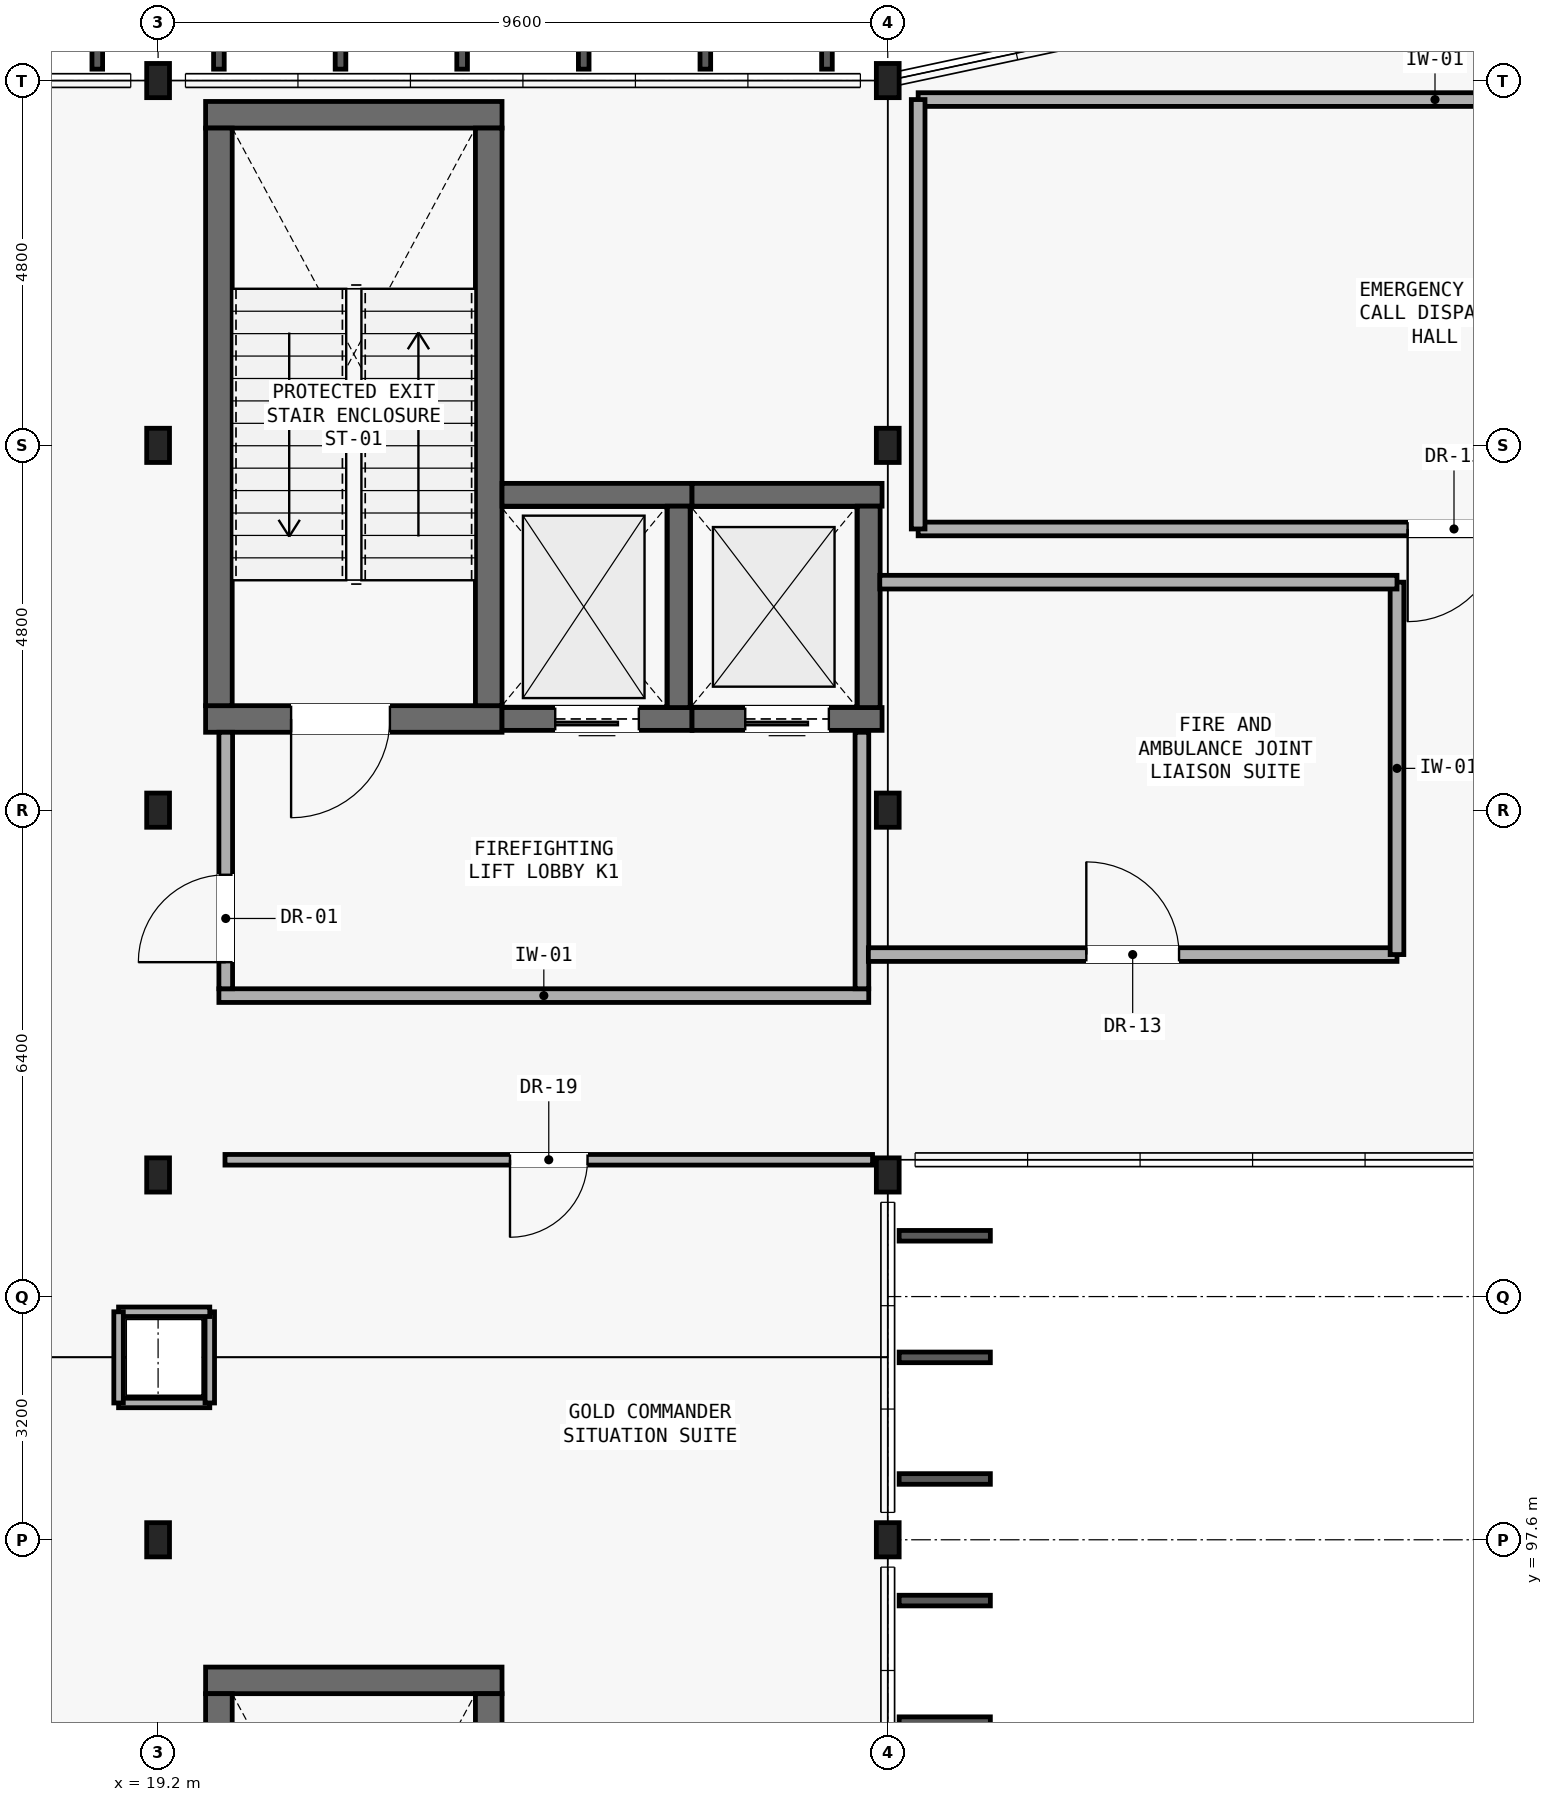
"""IFC4 building model, lengths in metres.
Left out: names, types, materials, properties, quantities, classifications, styles, units other than length and angle.
Written with IfcOpenShell. Run it as: python <this file> out.ifc"""

import sys

from ifc_helpers import new_model, si_unit, direction, frame, frame_2d, origin, origin_2d, place, context, subcontext, project, spatial, rectangle, i_section, extrude, element, fill, save


model = new_model("IFC4")
c1 = context("Model", 3, precision=1e-05, world=origin(), true_north=direction((0.0, 1.0)))
c2 = subcontext(c1, "Body", "Model", "MODEL_VIEW")
j1 = project(units=[si_unit("LENGTHUNIT", "METRE"), si_unit("PLANEANGLEUNIT", "RADIAN")], contexts=[c1])
p1 = place(None, origin())
s1 = spatial("IfcSite", under=j1, at=p1, CompositionType="ELEMENT")
p2 = place(p1, origin())
s2 = spatial("IfcBuilding", under=s1, at=p2, CompositionType="ELEMENT")
p3 = place(p2, frame((0.0, 0.0, 26.25)))
s3 = spatial("IfcBuildingStorey", under=s2, at=p3, CompositionType="ELEMENT", Elevation=26.25)
for number, where, z_axis, x_axis in (
    (1, (28.8, 97.6, 0.0), (0.0, 0.0, 1.0), (1.0, 0.0, 0.0)),
    (2, (28.8, 102.4, 0.0), (0.0, 0.0, 1.0), (1.0, 0.0, 0.0)),
    (3, (28.8, 107.2, 0.0), (0.0, 0.0, 1.0), (1.0, 0.0, 0.0)),
    (4, (28.8, 112.0, 0.0), (0.0, 0.0, 1.0), (1.0, 0.0, 0.0)),
    (5, (28.8, 116.8, 0.0), (0.0, 0.0, 1.0), (1.0, 0.0, 0.0)),
    (6, (19.2, 116.8, 0.0), (0.0, 0.0, 1.0), (1.0, 0.0, 0.0)),
    (7, (19.2, 97.6, 0.0), (0.0, 0.0, 1.0), (1.0, 0.0, 0.0)),
    (8, (19.2, 102.4, 0.0), (0.0, 0.0, 1.0), (1.0, 0.0, 0.0)),
    (9, (19.2, 107.2, 0.0), (0.0, 0.0, 1.0), (1.0, 0.0, 0.0)),
    (10, (19.2, 112.0, 0.0), (0.0, 0.0, 1.0), (1.0, 0.0, 0.0)),
):
    element("IfcColumn", number, at=place(p3, frame(where, z_axis=z_axis, x_axis=x_axis)), inside=s3, PredefinedType="COLUMN", context=c2, shape_type="SweptSolid", body=[
        extrude(i_section(OverallWidth=0.3, OverallDepth=0.45, WebThickness=0.014, FlangeThickness=0.026, FilletRadius=0.027, at=origin_2d()), origin(), (0.0, 0.0, 1.0), 4.9),
    ])
p4 = place(p3, frame((19.825, 108.4, 0.0), z_axis=(0.0, 0.0, 1.0), x_axis=(1.0, 0.0, 0.0)))
e11 = element("IfcWall", 11, at=p4, inside=s3, PredefinedType="SHEAR", context=c2, shape_type="SweptSolid", body=[
    extrude(rectangle(XDim=3.9, YDim=0.35, at=frame_2d((1.95, 0.0))), origin(), (0.0, 0.0, 1.0), 4.71),
])
p5 = place(p4, frame((1.125, 0.0, 0.0)))
e12 = element("IfcOpeningElement", 12, at=p5, cuts=e11, PredefinedType="OPENING", context=c2, shape_type="SweptSolid", body=[
    extrude(rectangle(XDim=1.3, YDim=2.15, at=frame_2d((0.65, 1.075))), frame((0.0, 0.185, 0.0), z_axis=(0.0, -1.0, 0.0), x_axis=(1.0, 0.0, 0.0)), (0.0, 0.0, 1.0), 0.37),
])
p6 = place(p3, frame((19.825, 116.35, 0.0), z_axis=(0.0, 0.0, 1.0), x_axis=(1.0, 0.0, 0.0)))
e13 = element("IfcWall", 13, at=p6, inside=s3, PredefinedType="SHEAR", context=c2, shape_type="SweptSolid", body=[
    extrude(rectangle(XDim=3.9, YDim=0.35, at=frame_2d((1.95, 0.0))), origin(), (0.0, 0.0, 1.0), 4.71),
])
for number, where, z_axis, x_axis in (
    (14, (20.0, 108.575, 0.0), (0.0, 0.0, 1.0), (0.0, 1.0, 0.0)),
    (15, (23.55, 108.575, 0.0), (0.0, 0.0, 1.0), (0.0, 1.0, 0.0)),
):
    element("IfcWall", number, at=place(p3, frame(where, z_axis=z_axis, x_axis=x_axis)), inside=s3, PredefinedType="SHEAR", context=c2, shape_type="SweptSolid", body=[
        extrude(rectangle(XDim=7.6, YDim=0.35, at=frame_2d((3.8, 0.0))), origin(), (0.0, 0.0, 1.0), 4.71),
    ])
p7 = place(p3, frame((23.725, 108.4, 0.0), z_axis=(0.0, 0.0, 1.0), x_axis=(1.0, 0.0, 0.0)))
e16 = element("IfcWall", 16, at=p7, inside=s3, PredefinedType="SHEAR", context=c2, shape_type="SweptSolid", body=[
    extrude(rectangle(XDim=2.5, YDim=0.3, at=frame_2d((1.25, 0.0))), origin(), (0.0, 0.0, 1.0), 4.71),
])
p8 = place(p7, frame((0.7, 0.0, 0.0)))
e17 = element("IfcOpeningElement", 17, at=p8, cuts=e16, PredefinedType="OPENING", context=c2, shape_type="SweptSolid", body=[
    extrude(rectangle(XDim=1.1, YDim=2.1, at=frame_2d((0.55, 1.05))), frame((0.0, 0.16, 0.0), z_axis=(0.0, -1.0, 0.0), x_axis=(1.0, 0.0, 0.0)), (0.0, 0.0, 1.0), 0.32),
])
p9 = place(p3, frame((23.725, 111.35, 0.0), z_axis=(0.0, 0.0, 1.0), x_axis=(1.0, 0.0, 0.0)))
e18 = element("IfcWall", 18, at=p9, inside=s3, PredefinedType="SHEAR", context=c2, shape_type="SweptSolid", body=[
    extrude(rectangle(XDim=2.5, YDim=0.3, at=frame_2d((1.25, 0.0))), origin(), (0.0, 0.0, 1.0), 4.71),
])
p10 = place(p3, frame((26.05, 108.55, 0.0), z_axis=(0.0, 0.0, 1.0), x_axis=(0.0, 1.0, 0.0)))
e19 = element("IfcWall", 19, at=p10, inside=s3, PredefinedType="SHEAR", context=c2, shape_type="SweptSolid", body=[
    extrude(rectangle(XDim=2.65, YDim=0.3, at=frame_2d((1.325, 0.0))), origin(), (0.0, 0.0, 1.0), 4.71),
])
p11 = place(p3, frame((26.225, 108.4, 0.0), z_axis=(0.0, 0.0, 1.0), x_axis=(1.0, 0.0, 0.0)))
e20 = element("IfcWall", 20, at=p11, inside=s3, PredefinedType="SHEAR", context=c2, shape_type="SweptSolid", body=[
    extrude(rectangle(XDim=2.5, YDim=0.3, at=frame_2d((1.25, 0.0))), origin(), (0.0, 0.0, 1.0), 4.71),
])
p12 = place(p11, frame((0.7, 0.0, 0.0)))
e21 = element("IfcOpeningElement", 21, at=p12, cuts=e20, PredefinedType="OPENING", context=c2, shape_type="SweptSolid", body=[
    extrude(rectangle(XDim=1.1, YDim=2.1, at=frame_2d((0.55, 1.05))), frame((0.0, 0.16, 0.0), z_axis=(0.0, -1.0, 0.0), x_axis=(1.0, 0.0, 0.0)), (0.0, 0.0, 1.0), 0.32),
])
p13 = place(p3, frame((26.225, 111.35, 0.0), z_axis=(0.0, 0.0, 1.0), x_axis=(1.0, 0.0, 0.0)))
e22 = element("IfcWall", 22, at=p13, inside=s3, PredefinedType="SHEAR", context=c2, shape_type="SweptSolid", body=[
    extrude(rectangle(XDim=2.5, YDim=0.3, at=frame_2d((1.25, 0.0))), origin(), (0.0, 0.0, 1.0), 4.71),
])
p14 = place(p3, frame((28.55, 108.55, 0.0), z_axis=(0.0, 0.0, 1.0), x_axis=(0.0, 1.0, 0.0)))
e23 = element("IfcWall", 23, at=p14, inside=s3, PredefinedType="SHEAR", context=c2, shape_type="SweptSolid", body=[
    extrude(rectangle(XDim=2.65, YDim=0.3, at=frame_2d((1.325, 0.0))), origin(), (0.0, 0.0, 1.0), 4.71),
])
p15 = place(p3, frame((20.0, 104.76, 0.0), z_axis=(0.0, 0.0, 1.0), x_axis=(1.0, 0.0, 0.0)))
e24 = element("IfcWall", 24, at=p15, inside=s3, PredefinedType="PARTITIONING", context=c2, shape_type="SweptSolid", body=[
    extrude(rectangle(XDim=8.55, YDim=0.18, at=frame_2d((4.275, 0.0))), origin(), (0.0, 0.0, 1.0), 4.19),
])
p16 = place(p3, frame((20.09, 104.85, 0.0), z_axis=(0.0, 0.0, 1.0), x_axis=(0.0, 1.0, 0.0)))
e25 = element("IfcWall", 25, at=p16, inside=s3, PredefinedType="PARTITIONING", context=c2, shape_type="SweptSolid", body=[
    extrude(rectangle(XDim=3.375, YDim=0.18, at=frame_2d((1.688, 0.0))), origin(), (0.0, 0.0, 1.0), 4.71),
])
p17 = place(p16, frame((0.35, 0.0, 0.0)))
e26 = element("IfcOpeningElement", 26, at=p17, cuts=e25, PredefinedType="OPENING", context=c2, shape_type="SweptSolid", body=[
    extrude(rectangle(XDim=1.15, YDim=2.15, at=frame_2d((0.575, 1.075))), frame((0.0, 0.1, 0.0), z_axis=(0.0, -1.0, 0.0), x_axis=(1.0, 0.0, 0.0)), (0.0, 0.0, 1.0), 0.2),
])
p18 = place(p3, frame((28.46, 104.85, 0.0), z_axis=(0.0, 0.0, 1.0), x_axis=(0.0, 1.0, 0.0)))
e27 = element("IfcWall", 27, at=p18, inside=s3, PredefinedType="PARTITIONING", context=c2, shape_type="SweptSolid", body=[
    extrude(rectangle(XDim=3.375, YDim=0.18, at=frame_2d((1.688, 0.0))), origin(), (0.0, 0.0, 1.0), 4.71),
])
p19 = place(p3, frame((19.825, 95.75, 0.0), z_axis=(0.0, 0.0, 1.0), x_axis=(1.0, 0.0, 0.0)))
e28 = element("IfcWall", 28, at=p19, inside=s3, PredefinedType="SHEAR", context=c2, shape_type="SweptSolid", body=[
    extrude(rectangle(XDim=3.9, YDim=0.35, at=frame_2d((1.95, 0.0))), origin(), (0.0, 0.0, 1.0), 4.71),
])
for number, where, z_axis, x_axis in (
    (29, (20.0, 87.975, 0.0), (0.0, 0.0, 1.0), (0.0, 1.0, 0.0)),
    (30, (23.55, 87.975, 0.0), (0.0, 0.0, 1.0), (0.0, 1.0, 0.0)),
):
    element("IfcWall", number, at=place(p3, frame(where, z_axis=z_axis, x_axis=x_axis)), inside=s3, PredefinedType="SHEAR", context=c2, shape_type="SweptSolid", body=[
        extrude(rectangle(XDim=7.6, YDim=0.35, at=frame_2d((3.8, 0.0))), origin(), (0.0, 0.0, 1.0), 4.71),
    ])
p20 = place(p3, frame((18.68, 99.4, 0.0), z_axis=(0.0, 0.0, 1.0), x_axis=(1.0, 0.0, 0.0)))
e31 = element("IfcWall", 31, at=p20, inside=s3, PredefinedType="PARTITIONING", context=c2, shape_type="SweptSolid", body=[
    extrude(rectangle(XDim=1.2, YDim=0.125, at=frame_2d((0.6, 0.0))), origin(), (0.0, 0.0, 1.0), 4.71),
])
p21 = place(p3, frame((19.88, 99.4, 0.0), z_axis=(0.0, 0.0, 1.0), x_axis=(0.0, 1.0, 0.0)))
e32 = element("IfcWall", 32, at=p21, inside=s3, PredefinedType="PARTITIONING", context=c2, shape_type="SweptSolid", body=[
    extrude(rectangle(XDim=1.2, YDim=0.125, at=frame_2d((0.6, 0.0))), origin(), (0.0, 0.0, 1.0), 4.71),
])
p22 = place(p3, frame((19.88, 100.6, 0.0), z_axis=(0.0, 0.0, 1.0), x_axis=(-1.0, 0.0, 0.0)))
e33 = element("IfcWall", 33, at=p22, inside=s3, PredefinedType="PARTITIONING", context=c2, shape_type="SweptSolid", body=[
    extrude(rectangle(XDim=1.2, YDim=0.125, at=frame_2d((0.6, 0.0))), origin(), (0.0, 0.0, 1.0), 4.71),
])
p23 = place(p3, frame((18.68, 100.6, 0.0), z_axis=(0.0, 0.0, 1.0), x_axis=(0.0, -1.0, 0.0)))
e34 = element("IfcWall", 34, at=p23, inside=s3, PredefinedType="PARTITIONING", context=c2, shape_type="SweptSolid", body=[
    extrude(rectangle(XDim=1.2, YDim=0.125, at=frame_2d((0.6, 0.0))), origin(), (0.0, 0.0, 1.0), 4.71),
])
p24 = place(p3, frame((28.6, 102.6, 0.0), z_axis=(0.0, 0.0, 1.0), x_axis=(-1.0, 0.0, 0.0)))
e35 = element("IfcWall", 35, at=p24, inside=s3, PredefinedType="PARTITIONING", context=c2, shape_type="SweptSolid", body=[
    extrude(rectangle(XDim=8.52, YDim=0.14, at=frame_2d((4.26, 0.0))), origin(), (0.0, 0.0, 1.0), 3.89),
])
p25 = place(p24, frame((3.75, 0.0, 0.0)))
e36 = element("IfcOpeningElement", 36, at=p25, cuts=e35, PredefinedType="OPENING", context=c2, shape_type="SweptSolid", body=[
    extrude(rectangle(XDim=1.02, YDim=2.1, at=frame_2d((0.51, 1.05))), frame((0.0, 0.08, 0.0), z_axis=(0.0, -1.0, 0.0), x_axis=(1.0, 0.0, 0.0)), (0.0, 0.0, 1.0), 0.16),
])
p26 = place(p3, frame((29.2, 110.9, 0.0), z_axis=(0.0, 0.0, 1.0), x_axis=(1.0, 0.0, 0.0)))
e37 = element("IfcWall", 37, at=p26, inside=s3, PredefinedType="PARTITIONING", context=c2, shape_type="SweptSolid", body=[
    extrude(rectangle(XDim=13.6, YDim=0.18, at=frame_2d((6.8, 0.0))), origin(), (0.0, 0.0, 1.0), 4.71),
])
p27 = place(p26, frame((6.44, 0.0, 0.0)))
e38 = element("IfcOpeningElement", 38, at=p27, cuts=e37, PredefinedType="OPENING", context=c2, shape_type="SweptSolid", body=[
    extrude(rectangle(XDim=1.22, YDim=2.1, at=frame_2d((0.61, 1.05))), frame((0.0, 0.1, 0.0), z_axis=(0.0, -1.0, 0.0), x_axis=(1.0, 0.0, 0.0)), (0.0, 0.0, 1.0), 0.2),
])
p28 = place(p3, frame((42.8, 116.55, 0.0), z_axis=(0.0, 0.0, 1.0), x_axis=(-1.0, 0.0, 0.0)))
e39 = element("IfcWall", 39, at=p28, inside=s3, PredefinedType="PARTITIONING", context=c2, shape_type="SweptSolid", body=[
    extrude(rectangle(XDim=13.6, YDim=0.18, at=frame_2d((6.8, 0.0))), origin(), (0.0, 0.0, 1.0), 4.335),
])
p29 = place(p3, frame((29.2, 116.55, 0.0), z_axis=(0.0, 0.0, 1.0), x_axis=(0.0, -1.0, 0.0)))
e40 = element("IfcWall", 40, at=p29, inside=s3, PredefinedType="PARTITIONING", context=c2, shape_type="SweptSolid", body=[
    extrude(rectangle(XDim=5.65, YDim=0.18, at=frame_2d((2.825, 0.0))), origin(), (0.0, 0.0, 1.0), 4.71),
])
p30 = place(p3, frame((28.545, 105.3, 0.0), z_axis=(0.0, 0.0, 1.0), x_axis=(1.0, 0.0, 0.0)))
e41 = element("IfcWall", 41, at=p30, inside=s3, PredefinedType="PARTITIONING", context=c2, shape_type="SweptSolid", body=[
    extrude(rectangle(XDim=6.955, YDim=0.18, at=frame_2d((3.478, 0.0))), origin(), (0.0, 0.0, 1.0), 4.285),
])
p31 = place(p30, frame((2.867, 0.0, 0.0)))
e42 = element("IfcOpeningElement", 42, at=p31, cuts=e41, PredefinedType="OPENING", context=c2, shape_type="SweptSolid", body=[
    extrude(rectangle(XDim=1.22, YDim=2.1, at=frame_2d((0.61, 1.05))), frame((0.0, 0.1, 0.0), z_axis=(0.0, -1.0, 0.0), x_axis=(1.0, 0.0, 0.0)), (0.0, 0.0, 1.0), 0.2),
])
p32 = place(p3, frame((35.5, 105.3, 0.0), z_axis=(0.0, 0.0, 1.0), x_axis=(0.0, 1.0, 0.0)))
e43 = element("IfcWall", 43, at=p32, inside=s3, PredefinedType="PARTITIONING", context=c2, shape_type="SweptSolid", body=[
    extrude(rectangle(XDim=4.9, YDim=0.18, at=frame_2d((2.45, 0.0))), origin(), (0.0, 0.0, 1.0), 4.71),
])
p33 = place(p3, frame((35.5, 110.2, 0.0), z_axis=(0.0, 0.0, 1.0), x_axis=(-1.0, 0.0, 0.0)))
e44 = element("IfcWall", 44, at=p33, inside=s3, PredefinedType="PARTITIONING", context=c2, shape_type="SweptSolid", body=[
    extrude(rectangle(XDim=6.805, YDim=0.18, at=frame_2d((3.402, 0.0))), origin(), (0.0, 0.0, 1.0), 4.105),
])
p34 = place(p5, frame((1.3, 0.0, 0.0), z_axis=(0.0, 0.0, 1.0), x_axis=(-1.0, 0.0, 0.0)))
e45 = element("IfcDoor", 45, at=p34, inside=s3, OperationType="SINGLE_SWING_LEFT", PredefinedType="DOOR", context=c2, shape_type="SweptSolid", body=[
    extrude(rectangle(XDim=1.3, YDim=2.15, at=frame_2d((0.65, 1.075))), frame((0.0, 0.025, 0.0), z_axis=(0.0, -1.0, 0.0), x_axis=(1.0, 0.0, 0.0)), (0.0, 0.0, 1.0), 0.05),
])
fill(e12, e45)
p35 = place(p8, frame((1.1, 0.0, 0.0), z_axis=(0.0, 0.0, 1.0), x_axis=(-1.0, 0.0, 0.0)))
e46 = element("IfcDoor", 46, at=p35, inside=s3, OperationType="SLIDING_TO_LEFT", PredefinedType="DOOR", context=c2, shape_type="SweptSolid", body=[
    extrude(rectangle(XDim=1.1, YDim=2.1, at=frame_2d((0.55, 1.05))), frame((0.0, 0.025, 0.0), z_axis=(0.0, -1.0, 0.0), x_axis=(1.0, 0.0, 0.0)), (0.0, 0.0, 1.0), 0.05),
])
fill(e17, e46)
p36 = place(p12, frame((1.1, 0.0, 0.0), z_axis=(0.0, 0.0, 1.0), x_axis=(-1.0, 0.0, 0.0)))
e47 = element("IfcDoor", 47, at=p36, inside=s3, OperationType="SLIDING_TO_LEFT", PredefinedType="DOOR", context=c2, shape_type="SweptSolid", body=[
    extrude(rectangle(XDim=1.1, YDim=2.1, at=frame_2d((0.55, 1.05))), frame((0.0, 0.025, 0.0), z_axis=(0.0, -1.0, 0.0), x_axis=(1.0, 0.0, 0.0)), (0.0, 0.0, 1.0), 0.05),
])
fill(e21, e47)
p37 = place(p17, origin())
e48 = element("IfcDoor", 48, at=p37, inside=s3, OperationType="SINGLE_SWING_LEFT", PredefinedType="DOOR", context=c2, shape_type="SweptSolid", body=[
    extrude(rectangle(XDim=1.15, YDim=2.15, at=frame_2d((0.575, 1.075))), frame((0.0, 0.025, 0.0), z_axis=(0.0, -1.0, 0.0), x_axis=(1.0, 0.0, 0.0)), (0.0, 0.0, 1.0), 0.05),
])
fill(e26, e48)
p38 = place(p25, origin())
e49 = element("IfcDoor", 49, at=p38, inside=s3, OperationType="SINGLE_SWING_RIGHT", PredefinedType="DOOR", context=c2, shape_type="SweptSolid", body=[
    extrude(rectangle(XDim=1.02, YDim=2.1, at=frame_2d((0.51, 1.05))), frame((0.0, 0.025, 0.0), z_axis=(0.0, -1.0, 0.0), x_axis=(1.0, 0.0, 0.0)), (0.0, 0.0, 1.0), 0.05),
])
fill(e36, e49)
p39 = place(p27, frame((1.22, 0.0, 0.0), z_axis=(0.0, 0.0, 1.0), x_axis=(-1.0, 0.0, 0.0)))
e50 = element("IfcDoor", 50, at=p39, inside=s3, OperationType="SINGLE_SWING_LEFT", PredefinedType="DOOR", context=c2, shape_type="SweptSolid", body=[
    extrude(rectangle(XDim=1.22, YDim=2.1, at=frame_2d((0.61, 1.05))), frame((0.0, 0.025, 0.0), z_axis=(0.0, -1.0, 0.0), x_axis=(1.0, 0.0, 0.0)), (0.0, 0.0, 1.0), 0.05),
])
fill(e38, e50)
p40 = place(p31, origin())
e51 = element("IfcDoor", 51, at=p40, inside=s3, OperationType="SINGLE_SWING_LEFT", PredefinedType="DOOR", context=c2, shape_type="SweptSolid", body=[
    extrude(rectangle(XDim=1.22, YDim=2.1, at=frame_2d((0.61, 1.05))), frame((0.0, 0.025, 0.0), z_axis=(0.0, -1.0, 0.0), x_axis=(1.0, 0.0, 0.0)), (0.0, 0.0, 1.0), 0.05),
])
fill(e42, e51)
save(model, sys.argv[1])
